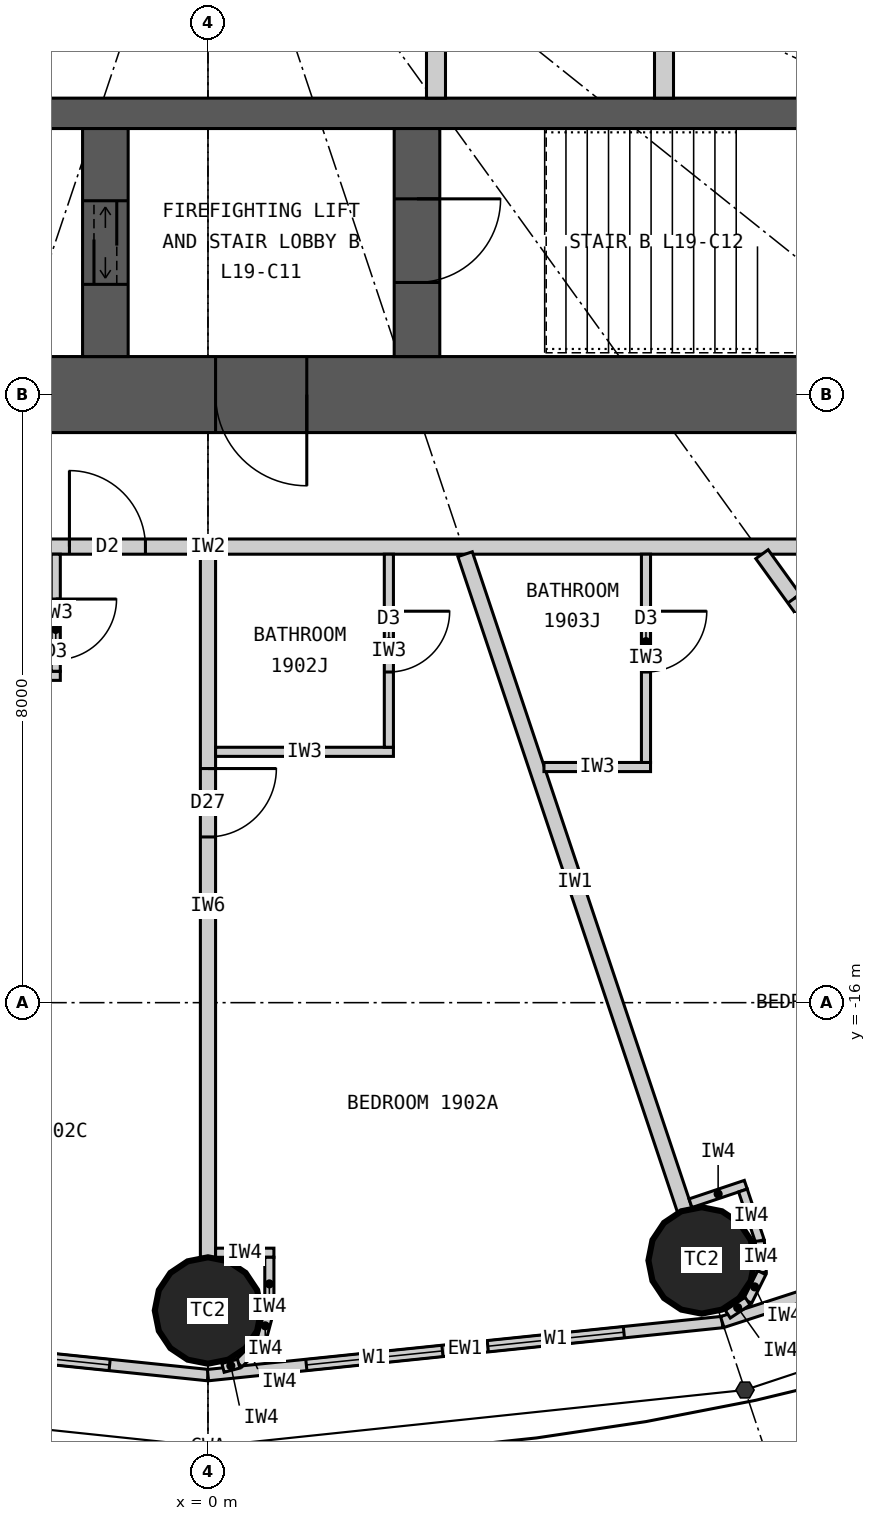
"""IFC4 building model, lengths in metres.
Left out: names, types, materials, properties, quantities, classifications, styles, units other than length and angle.
Written with IfcOpenShell. Run it as: python <this file> out.ifc"""

import sys

from ifc_helpers import new_model, si_unit, direction, frame, frame_2d, origin, origin_2d, place, context, subcontext, project, spatial, rectangle, circle, extrude, element, fill, save


model = new_model("IFC4")
c1 = context("Model", 3, precision=1e-05, world=origin(), true_north=direction((0.0, 1.0)))
c2 = subcontext(c1, "Body", "Model", "MODEL_VIEW")
j1 = project(units=[si_unit("LENGTHUNIT", "METRE"), si_unit("PLANEANGLEUNIT", "RADIAN")], contexts=[c1])
p1 = place(None, origin())
s1 = spatial("IfcSite", under=j1, at=p1, CompositionType="ELEMENT")
p2 = place(p1, origin())
s2 = spatial("IfcBuilding", under=s1, at=p2, CompositionType="ELEMENT")
p3 = place(p2, frame((0.0, 0.0, 77.1)))
s3 = spatial("IfcBuildingStorey", under=s2, at=p3, CompositionType="ELEMENT", Elevation=77.1)
for number, where, z_axis, x_axis in (
    (1, (0.0, -20.05, 0.0), (0.0, 0.0, 1.0), (1.0, 0.0, 0.0)),
    (2, (6.495, -19.391, 0.0), (0.0, 0.0, 1.0), (1.0, 0.0, 0.0)),
):
    element("IfcColumn", number, at=place(p3, frame(where, z_axis=z_axis, x_axis=x_axis)), inside=s3, PredefinedType="COLUMN", context=c2, shape_type="SweptSolid", body=[
        extrude(circle(Radius=0.7, at=origin_2d()), origin(), (0.0, 0.0, 1.0), 3.3),
    ])
p4 = place(p3, frame((12.5, -8.0, 0.0), z_axis=(0.0, 0.0, 1.0), x_axis=(-1.0, 0.0, 0.0)))
e3 = element("IfcWall", 3, at=p4, inside=s3, PredefinedType="SHEAR", context=c2, shape_type="SweptSolid", body=[
    extrude(rectangle(XDim=25.0, YDim=1.0, at=frame_2d((12.5, 0.0))), origin(), (0.0, 0.0, 1.0), 3.3),
])
p5 = place(p4, frame((11.2, 0.0, 0.0)))
e4 = element("IfcOpeningElement", 4, at=p5, cuts=e3, PredefinedType="OPENING", context=c2, shape_type="SweptSolid", body=[
    extrude(rectangle(XDim=1.2, YDim=2.2, at=frame_2d((0.6, 1.1))), frame((0.0, 0.51, 0.0), z_axis=(0.0, -1.0, 0.0), x_axis=(1.0, 0.0, 0.0)), (0.0, 0.0, 1.0), 1.02),
])
p6 = place(p4, frame((18.8, 0.0, 0.0)))
e5 = element("IfcOpeningElement", 5, at=p6, cuts=e3, PredefinedType="OPENING", context=c2, shape_type="SweptSolid", body=[
    extrude(rectangle(XDim=0.9, YDim=2.2, at=frame_2d((0.45, 1.1))), frame((0.0, 0.51, 0.0), z_axis=(0.0, -1.0, 0.0), x_axis=(1.0, 0.0, 0.0)), (0.0, 0.0, 1.0), 1.02),
])
p7 = place(p3, frame((-11.5, -4.3, 0.0), z_axis=(0.0, 0.0, 1.0), x_axis=(1.0, 0.0, 0.0)))
e6 = element("IfcWall", 6, at=p7, inside=s3, PredefinedType="SHEAR", context=c2, shape_type="SweptSolid", body=[
    extrude(rectangle(XDim=23.0, YDim=0.4, at=frame_2d((11.5, 0.0))), origin(), (0.0, 0.0, 1.0), 3.3),
])
p8 = place(p3, frame((2.75, -7.5, 0.0), z_axis=(0.0, 0.0, 1.0), x_axis=(0.0, 1.0, 0.0)))
e7 = element("IfcWall", 7, at=p8, inside=s3, PredefinedType="SHEAR", context=c2, shape_type="SweptSolid", body=[
    extrude(rectangle(XDim=3.0, YDim=0.6, at=frame_2d((1.5, 0.0))), origin(), (0.0, 0.0, 1.0), 3.3),
])
p9 = place(p8, frame((0.975, 0.0, 0.0)))
e8 = element("IfcOpeningElement", 8, at=p9, cuts=e7, PredefinedType="OPENING", context=c2, shape_type="SweptSolid", body=[
    extrude(rectangle(XDim=1.1, YDim=2.2, at=frame_2d((0.55, 1.1))), frame((0.0, 0.31, 0.0), z_axis=(0.0, -1.0, 0.0), x_axis=(1.0, 0.0, 0.0)), (0.0, 0.0, 1.0), 0.62),
])
p10 = place(p3, frame((-1.35, -7.5, 0.0), z_axis=(0.0, 0.0, 1.0), x_axis=(0.0, 1.0, 0.0)))
e9 = element("IfcWall", 9, at=p10, inside=s3, PredefinedType="SHEAR", context=c2, shape_type="SweptSolid", body=[
    extrude(rectangle(XDim=3.0, YDim=0.6, at=frame_2d((1.5, 0.0))), origin(), (0.0, 0.0, 1.0), 3.3),
])
p11 = place(p10, frame((0.95, 0.0, 0.0)))
e10 = element("IfcOpeningElement", 10, at=p11, cuts=e9, PredefinedType="OPENING", context=c2, shape_type="SweptSolid", body=[
    extrude(rectangle(XDim=1.1, YDim=2.2, at=frame_2d((0.55, 1.1))), frame((0.0, 0.31, 0.0), z_axis=(0.0, -1.0, 0.0), x_axis=(1.0, 0.0, 0.0)), (0.0, 0.0, 1.0), 0.62),
])
for number, where, z_axis, x_axis in (
    (11, (3.0, -4.1, 0.0), (0.0, 0.0, 1.0), (0.0, 1.0, 0.0)),
    (12, (6.0, -4.1, 0.0), (0.0, 0.0, 1.0), (0.0, 1.0, 0.0)),
):
    element("IfcWall", number, at=place(p3, frame(where, z_axis=z_axis, x_axis=x_axis)), inside=s3, PredefinedType="PARTITIONING", context=c2, shape_type="SweptSolid", body=[
        extrude(rectangle(XDim=2.35, YDim=0.25, at=frame_2d((1.175, 0.0))), origin(), (0.0, 0.0, 1.0), 3.3),
    ])
p12 = place(p3, frame((-6.766, -20.202, 0.0), z_axis=(0.0, 0.0, 1.0), x_axis=(0.994721394369, -0.102612609291, 0.0)))
e13 = element("IfcWall", 13, at=p12, inside=s3, PredefinedType="ELEMENTEDWALL", context=c2, shape_type="SweptSolid", body=[
    extrude(rectangle(XDim=6.802, YDim=0.15, at=frame_2d((3.401, 0.0))), origin(), (0.0, 0.0, 1.0), 3.12),
])
p13 = place(p12, frame((1.301, 0.0, 0.9)))
e14 = element("IfcOpeningElement", 14, at=p13, cuts=e13, PredefinedType="OPENING", context=c2, shape_type="SweptSolid", body=[
    extrude(rectangle(XDim=1.8, YDim=1.9, at=frame_2d((0.9, 0.95))), frame((0.0, 0.085, 0.0), z_axis=(0.0, -1.0, 0.0), x_axis=(1.0, 0.0, 0.0)), (0.0, 0.0, 1.0), 0.17),
])
p14 = place(p12, frame((3.701, 0.0, 0.9)))
e15 = element("IfcOpeningElement", 15, at=p14, cuts=e13, PredefinedType="OPENING", context=c2, shape_type="SweptSolid", body=[
    extrude(rectangle(XDim=1.8, YDim=1.9, at=frame_2d((0.9, 0.95))), frame((0.0, 0.085, 0.0), z_axis=(0.0, -1.0, 0.0), x_axis=(1.0, 0.0, 0.0)), (0.0, 0.0, 1.0), 0.17),
])
p15 = place(p3, frame((0.0, -20.9, 0.0), z_axis=(0.0, 0.0, 1.0), x_axis=(0.994721394369, 0.102612609291, 0.0)))
e16 = element("IfcWall", 16, at=p15, inside=s3, PredefinedType="ELEMENTEDWALL", context=c2, shape_type="SweptSolid", body=[
    extrude(rectangle(XDim=6.802, YDim=0.15, at=frame_2d((3.401, 0.0))), origin(), (0.0, 0.0, 1.0), 3.12),
])
p16 = place(p15, frame((1.301, 0.0, 0.9)))
e17 = element("IfcOpeningElement", 17, at=p16, cuts=e16, PredefinedType="OPENING", context=c2, shape_type="SweptSolid", body=[
    extrude(rectangle(XDim=1.8, YDim=1.9, at=frame_2d((0.9, 0.95))), frame((0.0, 0.085, 0.0), z_axis=(0.0, -1.0, 0.0), x_axis=(1.0, 0.0, 0.0)), (0.0, 0.0, 1.0), 0.17),
])
p17 = place(p15, frame((3.701, 0.0, 0.9)))
e18 = element("IfcOpeningElement", 18, at=p17, cuts=e16, PredefinedType="OPENING", context=c2, shape_type="SweptSolid", body=[
    extrude(rectangle(XDim=1.8, YDim=1.9, at=frame_2d((0.9, 0.95))), frame((0.0, 0.085, 0.0), z_axis=(0.0, -1.0, 0.0), x_axis=(1.0, 0.0, 0.0)), (0.0, 0.0, 1.0), 0.17),
])
p18 = place(p3, frame((6.766, -20.202, 0.0), z_axis=(0.0, 0.0, 1.0), x_axis=(0.951137534625, 0.308767534285, 0.0)))
e19 = element("IfcWall", 19, at=p18, inside=s3, PredefinedType="ELEMENTEDWALL", context=c2, shape_type="SweptSolid", body=[
    extrude(rectangle(XDim=6.655, YDim=0.15, at=frame_2d((3.328, 0.0))), origin(), (0.0, 0.0, 1.0), 3.12),
])
p19 = place(p18, frame((1.228, 0.0, 0.9)))
e20 = element("IfcOpeningElement", 20, at=p19, cuts=e19, PredefinedType="OPENING", context=c2, shape_type="SweptSolid", body=[
    extrude(rectangle(XDim=1.8, YDim=1.9, at=frame_2d((0.9, 0.95))), frame((0.0, 0.085, 0.0), z_axis=(0.0, -1.0, 0.0), x_axis=(1.0, 0.0, 0.0)), (0.0, 0.0, 1.0), 0.17),
])
p20 = place(p18, frame((3.628, 0.0, 0.9)))
e21 = element("IfcOpeningElement", 21, at=p20, cuts=e19, PredefinedType="OPENING", context=c2, shape_type="SweptSolid", body=[
    extrude(rectangle(XDim=1.8, YDim=1.9, at=frame_2d((0.9, 0.95))), frame((0.0, 0.085, 0.0), z_axis=(0.0, -1.0, 0.0), x_axis=(1.0, 0.0, 0.0)), (0.0, 0.0, 1.0), 0.17),
])
p21 = place(p3, frame((14.1, -10.0, 0.0), z_axis=(0.0, 0.0, 1.0), x_axis=(-1.0, 0.0, 0.0)))
e22 = element("IfcWall", 22, at=p21, inside=s3, PredefinedType="PARTITIONING", context=c2, shape_type="SweptSolid", body=[
    extrude(rectangle(XDim=28.2, YDim=0.2, at=frame_2d((14.1, 0.0))), origin(), (0.0, 0.0, 1.0), 3.12),
])
p22 = place(p21, frame((24.165, 0.0, 0.0)))
e23 = element("IfcOpeningElement", 23, at=p22, cuts=e22, PredefinedType="OPENING", context=c2, shape_type="SweptSolid", body=[
    extrude(rectangle(XDim=1.0, YDim=2.2, at=frame_2d((0.5, 1.1))), frame((0.0, 0.11, 0.0), z_axis=(0.0, -1.0, 0.0), x_axis=(1.0, 0.0, 0.0)), (0.0, 0.0, 1.0), 0.22),
])
p23 = place(p21, frame((14.923, 0.0, 0.0)))
e24 = element("IfcOpeningElement", 24, at=p23, cuts=e22, PredefinedType="OPENING", context=c2, shape_type="SweptSolid", body=[
    extrude(rectangle(XDim=1.0, YDim=2.2, at=frame_2d((0.5, 1.1))), frame((0.0, 0.11, 0.0), z_axis=(0.0, -1.0, 0.0), x_axis=(1.0, 0.0, 0.0)), (0.0, 0.0, 1.0), 0.22),
])
p24 = place(p21, frame((3.035, 0.0, 0.0)))
e25 = element("IfcOpeningElement", 25, at=p24, cuts=e22, PredefinedType="OPENING", context=c2, shape_type="SweptSolid", body=[
    extrude(rectangle(XDim=1.0, YDim=2.2, at=frame_2d((0.5, 1.1))), frame((0.0, 0.11, 0.0), z_axis=(0.0, -1.0, 0.0), x_axis=(1.0, 0.0, 0.0)), (0.0, 0.0, 1.0), 0.22),
])
p25 = place(p3, frame((0.0, -10.1, 0.0), z_axis=(0.0, 0.0, 1.0), x_axis=(0.0, -1.0, 0.0)))
e26 = element("IfcWall", 26, at=p25, inside=s3, PredefinedType="PARTITIONING", context=c2, shape_type="SweptSolid", body=[
    extrude(rectangle(XDim=9.25, YDim=0.2, at=frame_2d((4.625, 0.0))), origin(), (0.0, 0.0, 1.0), 2.32),
])
p26 = place(p25, frame((2.82, 0.0, 0.0)))
e27 = element("IfcOpeningElement", 27, at=p26, cuts=e26, PredefinedType="OPENING", context=c2, shape_type="SweptSolid", body=[
    extrude(rectangle(XDim=0.9, YDim=2.1, at=frame_2d((0.45, 1.05))), frame((0.0, 0.11, 0.0), z_axis=(0.0, -1.0, 0.0), x_axis=(1.0, 0.0, 0.0)), (0.0, 0.0, 1.0), 0.22),
])
p27 = place(p3, frame((3.383, -10.1, 0.0), z_axis=(0.0, 0.0, 1.0), x_axis=(0.31759592231, -0.948226149256, 0.0)))
e28 = element("IfcWall", 28, at=p27, inside=s3, PredefinedType="PARTITIONING", context=c2, shape_type="SweptSolid", body=[
    extrude(rectangle(XDim=9.098, YDim=0.2, at=frame_2d((4.549, 0.0))), origin(), (0.0, 0.0, 1.0), 2.32),
])
p28 = place(p3, frame((7.289, -10.1, 0.0), z_axis=(0.0, 0.0, 1.0), x_axis=(0.585198353053, -0.810890182197, 0.0)))
e29 = element("IfcWall", 29, at=p28, inside=s3, PredefinedType="PARTITIONING", context=c2, shape_type="SweptSolid", body=[
    extrude(rectangle(XDim=8.36, YDim=0.2, at=frame_2d((4.18, 0.0))), origin(), (0.0, 0.0, 1.0), 2.32),
])
p29 = place(p28, frame((0.72, 0.0, 0.0)))
e30 = element("IfcOpeningElement", 30, at=p29, cuts=e29, PredefinedType="OPENING", context=c2, shape_type="SweptSolid", body=[
    extrude(rectangle(XDim=0.9, YDim=2.1, at=frame_2d((0.45, 1.05))), frame((0.0, 0.11, 0.0), z_axis=(0.0, -1.0, 0.0), x_axis=(1.0, 0.0, 0.0)), (0.0, 0.0, 1.0), 0.22),
])
p30 = place(p3, frame((-3.819, -11.7, 0.0), z_axis=(0.0, 0.0, 1.0), x_axis=(1.0, 0.0, 0.0)))
e31 = element("IfcWall", 31, at=p30, inside=s3, PredefinedType="PARTITIONING", context=c2, shape_type="SweptSolid", body=[
    extrude(rectangle(XDim=1.876, YDim=0.12, at=frame_2d((0.938, 0.0))), origin(), (0.0, 0.0, 1.0), 3.12),
])
p31 = place(p3, frame((-2.003, -10.1, 0.0), z_axis=(0.0, 0.0, 1.0), x_axis=(0.0, -1.0, 0.0)))
e32 = element("IfcWall", 32, at=p31, inside=s3, PredefinedType="PARTITIONING", context=c2, shape_type="SweptSolid", body=[
    extrude(rectangle(XDim=1.54, YDim=0.12, at=frame_2d((0.77, 0.0))), origin(), (0.0, 0.0, 1.0), 3.12),
])
p32 = place(p31, frame((0.59, 0.0, 0.0)))
e33 = element("IfcOpeningElement", 33, at=p32, cuts=e32, PredefinedType="OPENING", context=c2, shape_type="SweptSolid", body=[
    extrude(rectangle(XDim=0.8, YDim=2.1, at=frame_2d((0.4, 1.05))), frame((0.0, 0.07, 0.0), z_axis=(0.0, -1.0, 0.0), x_axis=(1.0, 0.0, 0.0)), (0.0, 0.0, 1.0), 0.14),
])
p33 = place(p3, frame((0.1, -12.7, 0.0), z_axis=(0.0, 0.0, 1.0), x_axis=(1.0, 0.0, 0.0)))
e34 = element("IfcWall", 34, at=p33, inside=s3, PredefinedType="PARTITIONING", context=c2, shape_type="SweptSolid", body=[
    extrude(rectangle(XDim=2.34, YDim=0.12, at=frame_2d((1.17, 0.0))), origin(), (0.0, 0.0, 1.0), 3.12),
])
p34 = place(p3, frame((2.38, -10.1, 0.0), z_axis=(0.0, 0.0, 1.0), x_axis=(0.0, -1.0, 0.0)))
e35 = element("IfcWall", 35, at=p34, inside=s3, PredefinedType="PARTITIONING", context=c2, shape_type="SweptSolid", body=[
    extrude(rectangle(XDim=2.54, YDim=0.12, at=frame_2d((1.27, 0.0))), origin(), (0.0, 0.0, 1.0), 3.12),
])
p35 = place(p34, frame((0.75, 0.0, 0.0)))
e36 = element("IfcOpeningElement", 36, at=p35, cuts=e35, PredefinedType="OPENING", context=c2, shape_type="SweptSolid", body=[
    extrude(rectangle(XDim=0.8, YDim=2.1, at=frame_2d((0.4, 1.05))), frame((0.0, 0.07, 0.0), z_axis=(0.0, -1.0, 0.0), x_axis=(1.0, 0.0, 0.0)), (0.0, 0.0, 1.0), 0.14),
])
p36 = place(p3, frame((4.421, -12.9, 0.0), z_axis=(0.0, 0.0, 1.0), x_axis=(1.0, 0.0, 0.0)))
e37 = element("IfcWall", 37, at=p36, inside=s3, PredefinedType="PARTITIONING", context=c2, shape_type="SweptSolid", body=[
    extrude(rectangle(XDim=1.402, YDim=0.12, at=frame_2d((0.701, 0.0))), origin(), (0.0, 0.0, 1.0), 3.12),
])
p37 = place(p3, frame((5.763, -10.1, 0.0), z_axis=(0.0, 0.0, 1.0), x_axis=(0.0, -1.0, 0.0)))
e38 = element("IfcWall", 38, at=p37, inside=s3, PredefinedType="PARTITIONING", context=c2, shape_type="SweptSolid", body=[
    extrude(rectangle(XDim=2.74, YDim=0.12, at=frame_2d((1.37, 0.0))), origin(), (0.0, 0.0, 1.0), 3.12),
])
p38 = place(p37, frame((0.75, 0.0, 0.0)))
e39 = element("IfcOpeningElement", 39, at=p38, cuts=e38, PredefinedType="OPENING", context=c2, shape_type="SweptSolid", body=[
    extrude(rectangle(XDim=0.8, YDim=2.1, at=frame_2d((0.4, 1.05))), frame((0.0, 0.07, 0.0), z_axis=(0.0, -1.0, 0.0), x_axis=(1.0, 0.0, 0.0)), (0.0, 0.0, 1.0), 0.14),
])
p39 = place(p3, frame((0.1, -19.29, 0.0), z_axis=(0.0, 0.0, 1.0), x_axis=(1.0, 0.0, 0.0)))
e40 = element("IfcWall", 40, at=p39, inside=s3, PredefinedType="PARTITIONING", context=c2, shape_type="SweptSolid", body=[
    extrude(rectangle(XDim=0.767, YDim=0.12, at=frame_2d((0.384, 0.0))), origin(), (0.0, 0.0, 1.0), 3.12),
])
p40 = place(p3, frame((0.808, -19.35, 0.0), z_axis=(0.0, 0.0, 1.0), x_axis=(0.0, -1.0, 0.0)))
e41 = element("IfcWall", 41, at=p40, inside=s3, PredefinedType="PARTITIONING", context=c2, shape_type="SweptSolid", body=[
    extrude(rectangle(XDim=0.7, YDim=0.12, at=frame_2d((0.35, 0.0))), origin(), (0.0, 0.0, 1.0), 3.12),
])
p41 = place(p3, frame((0.808, -20.05, 0.0), z_axis=(0.0, 0.0, 1.0), x_axis=(-0.2592614205, -0.965807183573, 0.0)))
e42 = element("IfcWall", 42, at=p41, inside=s3, PredefinedType="PARTITIONING", context=c2, shape_type="SweptSolid", body=[
    extrude(rectangle(XDim=0.418, YDim=0.12, at=frame_2d((0.209, 0.0))), origin(), (0.0, 0.0, 1.0), 3.12),
])
p42 = place(p3, frame((0.699, -20.454, 0.0), z_axis=(0.0, 0.0, 1.0), x_axis=(-0.707106781187, -0.707106781187, 0.0)))
e43 = element("IfcWall", 43, at=p42, inside=s3, PredefinedType="PARTITIONING", context=c2, shape_type="SweptSolid", body=[
    extrude(rectangle(XDim=0.418, YDim=0.12, at=frame_2d((0.209, 0.0))), origin(), (0.0, 0.0, 1.0), 3.12),
])
p43 = place(p3, frame((0.404, -20.749, 0.0), z_axis=(0.0, 0.0, 1.0), x_axis=(-0.965759066438, -0.25944060128, 0.0)))
e44 = element("IfcWall", 44, at=p43, inside=s3, PredefinedType="PARTITIONING", context=c2, shape_type="SweptSolid", body=[
    extrude(rectangle(XDim=0.214, YDim=0.12, at=frame_2d((0.107, 0.0))), origin(), (0.0, 0.0, 1.0), 3.12),
])
p44 = place(p3, frame((6.348, -18.639, 0.0), z_axis=(0.0, 0.0, 1.0), x_axis=(0.948268951266, 0.317468102437, 0.0)))
e45 = element("IfcWall", 45, at=p44, inside=s3, PredefinedType="PARTITIONING", context=c2, shape_type="SweptSolid", body=[
    extrude(rectangle(XDim=0.768, YDim=0.12, at=frame_2d((0.384, 0.0))), origin(), (0.0, 0.0, 1.0), 3.12),
])
p45 = place(p3, frame((7.038, -18.471, 0.0), z_axis=(0.0, 0.0, 1.0), x_axis=(0.317378466199, -0.9482989556, 0.0)))
e46 = element("IfcWall", 46, at=p45, inside=s3, PredefinedType="PARTITIONING", context=c2, shape_type="SweptSolid", body=[
    extrude(rectangle(XDim=0.7, YDim=0.12, at=frame_2d((0.35, 0.0))), origin(), (0.0, 0.0, 1.0), 3.12),
])
p46 = place(p3, frame((7.26, -19.135, 0.0), z_axis=(0.0, 0.0, 1.0), x_axis=(0.0613238046, -0.99811792439, 0.0)))
e47 = element("IfcWall", 47, at=p46, inside=s3, PredefinedType="PARTITIONING", context=c2, shape_type="SweptSolid", body=[
    extrude(rectangle(XDim=0.418, YDim=0.12, at=frame_2d((0.209, 0.0))), origin(), (0.0, 0.0, 1.0), 3.12),
])
p47 = place(p3, frame((7.286, -19.552, 0.0), z_axis=(0.0, 0.0, 1.0), x_axis=(-0.445810757773, -0.89512723579, 0.0)))
e48 = element("IfcWall", 48, at=p47, inside=s3, PredefinedType="PARTITIONING", context=c2, shape_type="SweptSolid", body=[
    extrude(rectangle(XDim=0.418, YDim=0.12, at=frame_2d((0.209, 0.0))), origin(), (0.0, 0.0, 1.0), 3.12),
])
p48 = place(p3, frame((7.1, -19.926, 0.0), z_axis=(0.0, 0.0, 1.0), x_axis=(-0.833488262509, -0.552537162787, 0.0)))
e49 = element("IfcWall", 49, at=p48, inside=s3, PredefinedType="PARTITIONING", context=c2, shape_type="SweptSolid", body=[
    extrude(rectangle(XDim=0.313, YDim=0.12, at=frame_2d((0.156, 0.0))), origin(), (0.0, 0.0, 1.0), 3.12),
])
p49 = place(p14, origin())
e50 = element("IfcWindow", 50, at=p49, inside=s3, PartitioningType="SINGLE_PANEL", PredefinedType="WINDOW", context=c2, shape_type="SweptSolid", body=[
    extrude(rectangle(XDim=1.8, YDim=1.9, at=frame_2d((0.9, 0.95))), frame((0.0, 0.03, 0.0), z_axis=(0.0, -1.0, 0.0), x_axis=(1.0, 0.0, 0.0)), (0.0, 0.0, 1.0), 0.06),
])
fill(e15, e50)
p50 = place(p16, origin())
e51 = element("IfcWindow", 51, at=p50, inside=s3, PartitioningType="SINGLE_PANEL", PredefinedType="WINDOW", context=c2, shape_type="SweptSolid", body=[
    extrude(rectangle(XDim=1.8, YDim=1.9, at=frame_2d((0.9, 0.95))), frame((0.0, 0.03, 0.0), z_axis=(0.0, -1.0, 0.0), x_axis=(1.0, 0.0, 0.0)), (0.0, 0.0, 1.0), 0.06),
])
fill(e17, e51)
p51 = place(p17, origin())
e52 = element("IfcWindow", 52, at=p51, inside=s3, PartitioningType="SINGLE_PANEL", PredefinedType="WINDOW", context=c2, shape_type="SweptSolid", body=[
    extrude(rectangle(XDim=1.8, YDim=1.9, at=frame_2d((0.9, 0.95))), frame((0.0, 0.03, 0.0), z_axis=(0.0, -1.0, 0.0), x_axis=(1.0, 0.0, 0.0)), (0.0, 0.0, 1.0), 0.06),
])
fill(e18, e52)
p52 = place(p32, origin())
e53 = element("IfcDoor", 53, at=p52, inside=s3, OperationType="SINGLE_SWING_LEFT", PredefinedType="DOOR", context=c2, shape_type="SweptSolid", body=[
    extrude(rectangle(XDim=0.8, YDim=2.1, at=frame_2d((0.4, 1.05))), frame((0.0, 0.025, 0.0), z_axis=(0.0, -1.0, 0.0), x_axis=(1.0, 0.0, 0.0)), (0.0, 0.0, 1.0), 0.05),
])
fill(e33, e53)
p53 = place(p23, origin())
e54 = element("IfcDoor", 54, at=p53, inside=s3, OperationType="SINGLE_SWING_RIGHT", PredefinedType="DOOR", context=c2, shape_type="SweptSolid", body=[
    extrude(rectangle(XDim=1.0, YDim=2.2, at=frame_2d((0.5, 1.1))), frame((0.0, 0.025, 0.0), z_axis=(0.0, -1.0, 0.0), x_axis=(1.0, 0.0, 0.0)), (0.0, 0.0, 1.0), 0.05),
])
fill(e24, e54)
p54 = place(p35, origin())
e55 = element("IfcDoor", 55, at=p54, inside=s3, OperationType="SINGLE_SWING_LEFT", PredefinedType="DOOR", context=c2, shape_type="SweptSolid", body=[
    extrude(rectangle(XDim=0.8, YDim=2.1, at=frame_2d((0.4, 1.05))), frame((0.0, 0.025, 0.0), z_axis=(0.0, -1.0, 0.0), x_axis=(1.0, 0.0, 0.0)), (0.0, 0.0, 1.0), 0.05),
])
fill(e36, e55)
p55 = place(p26, origin())
e56 = element("IfcDoor", 56, at=p55, inside=s3, OperationType="SINGLE_SWING_LEFT", PredefinedType="DOOR", context=c2, shape_type="SweptSolid", body=[
    extrude(rectangle(XDim=0.9, YDim=2.1, at=frame_2d((0.45, 1.05))), frame((0.0, 0.025, 0.0), z_axis=(0.0, -1.0, 0.0), x_axis=(1.0, 0.0, 0.0)), (0.0, 0.0, 1.0), 0.05),
])
fill(e27, e56)
p56 = place(p38, origin())
e57 = element("IfcDoor", 57, at=p56, inside=s3, OperationType="SINGLE_SWING_LEFT", PredefinedType="DOOR", context=c2, shape_type="SweptSolid", body=[
    extrude(rectangle(XDim=0.8, YDim=2.1, at=frame_2d((0.4, 1.05))), frame((0.0, 0.025, 0.0), z_axis=(0.0, -1.0, 0.0), x_axis=(1.0, 0.0, 0.0)), (0.0, 0.0, 1.0), 0.05),
])
fill(e39, e57)
p57 = place(p29, origin())
e58 = element("IfcDoor", 58, at=p57, inside=s3, OperationType="SINGLE_SWING_LEFT", PredefinedType="DOOR", context=c2, shape_type="SweptSolid", body=[
    extrude(rectangle(XDim=0.9, YDim=2.1, at=frame_2d((0.45, 1.05))), frame((0.0, 0.025, 0.0), z_axis=(0.0, -1.0, 0.0), x_axis=(1.0, 0.0, 0.0)), (0.0, 0.0, 1.0), 0.05),
])
fill(e30, e58)
p58 = place(p5, origin())
e59 = element("IfcDoor", 59, at=p58, inside=s3, OperationType="SINGLE_SWING_LEFT", PredefinedType="DOOR", context=c2, shape_type="SweptSolid", body=[
    extrude(rectangle(XDim=1.2, YDim=2.2, at=frame_2d((0.6, 1.1))), frame((0.0, 0.025, 0.0), z_axis=(0.0, -1.0, 0.0), x_axis=(1.0, 0.0, 0.0)), (0.0, 0.0, 1.0), 0.05),
])
fill(e4, e59)
p59 = place(p9, origin())
e60 = element("IfcDoor", 60, at=p59, inside=s3, OperationType="SINGLE_SWING_RIGHT", PredefinedType="DOOR", context=c2, shape_type="SweptSolid", body=[
    extrude(rectangle(XDim=1.1, YDim=2.2, at=frame_2d((0.55, 1.1))), frame((0.0, 0.025, 0.0), z_axis=(0.0, -1.0, 0.0), x_axis=(1.0, 0.0, 0.0)), (0.0, 0.0, 1.0), 0.05),
])
fill(e8, e60)
p60 = place(p11, origin())
e61 = element("IfcDoor", 61, at=p60, inside=s3, OperationType="DOUBLE_DOOR_SLIDING", PredefinedType="DOOR", context=c2, shape_type="SweptSolid", body=[
    extrude(rectangle(XDim=1.1, YDim=2.2, at=frame_2d((0.55, 1.1))), frame((0.0, 0.025, 0.0), z_axis=(0.0, -1.0, 0.0), x_axis=(1.0, 0.0, 0.0)), (0.0, 0.0, 1.0), 0.05),
])
fill(e10, e61)
save(model, sys.argv[1])
